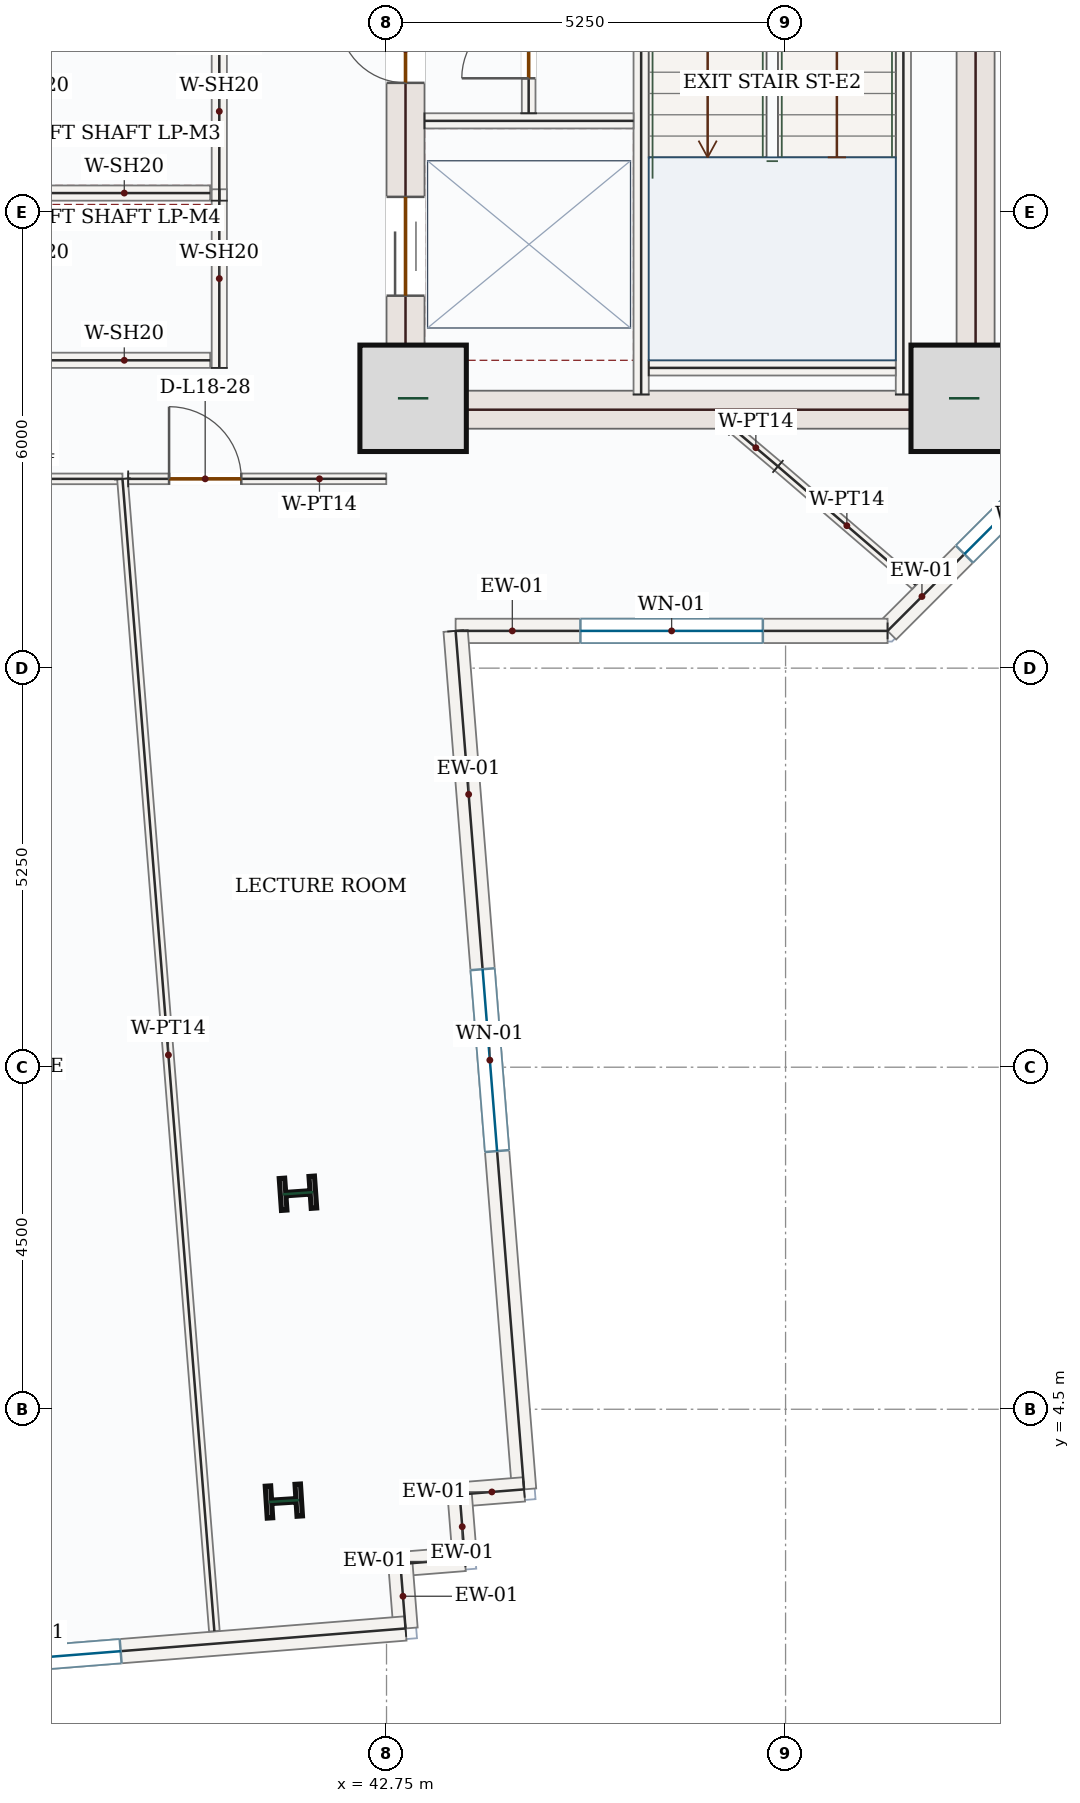
"""IFC4 building model, lengths in metres.
Left out: names, types, materials, properties, quantities, classifications, styles, units other than length and angle.
Written with IfcOpenShell. Run it as: python <this file> out.ifc"""

import sys

from ifc_helpers import new_model, si_unit, direction, frame, frame_2d, origin, origin_2d, place, context, subcontext, project, spatial, rectangle, i_section, extrude, source, transform, mapped, element, fill, save


model = new_model("IFC4")
c1 = context("Model", 3, precision=1e-05, world=origin(), true_north=direction((0.0, 1.0)))
c2 = subcontext(c1, "Body", "Model", "MODEL_VIEW")
j1 = project(units=[si_unit("LENGTHUNIT", "METRE"), si_unit("PLANEANGLEUNIT", "RADIAN")], contexts=[c1])
p1 = place(None, origin())
s1 = spatial("IfcSite", under=j1, at=p1, CompositionType="ELEMENT")
p2 = place(p1, origin())
s2 = spatial("IfcBuilding", under=s1, at=p2, CompositionType="ELEMENT")
p3 = place(p2, frame((0.0, 0.0, 83.7)))
s3 = spatial("IfcBuildingStorey", under=s2, at=p3, CompositionType="ELEMENT", Elevation=83.7)
p4 = place(p3, frame((43.0, 17.4, 0.0), z_axis=(0.0, 0.0, 1.0), x_axis=(0.0, 1.0, 0.0)))
e1 = element("IfcWall", 1, at=p4, inside=s3, PredefinedType="SHEAR", context=c2, shape_type="SweptSolid", body=[
    extrude(rectangle(XDim=8.55, YDim=0.5, at=frame_2d((4.275, 0.0))), origin(), (0.0, 0.0, 1.0), 3.95),
])
p5 = place(p4, frame((6.65, 0.0, 0.0)))
e2 = element("IfcOpeningElement", 2, at=p5, cuts=e1, PredefinedType="OPENING", context=c2, shape_type="SweptSolid", body=[
    extrude(rectangle(XDim=1.1, YDim=2.2, at=frame_2d((0.55, 1.1))), frame((0.0, 0.26, 0.0), z_axis=(0.0, -1.0, 0.0), x_axis=(1.0, 0.0, 0.0)), (0.0, 0.0, 1.0), 0.52),
])
p6 = place(p4, frame((1.75, 0.0, 0.0)))
e3 = element("IfcOpeningElement", 3, at=p6, cuts=e1, PredefinedType="OPENING", context=c2, shape_type="SweptSolid", body=[
    extrude(rectangle(XDim=1.3, YDim=2.2, at=frame_2d((0.65, 1.1))), frame((0.0, 0.26, 0.0), z_axis=(0.0, -1.0, 0.0), x_axis=(1.0, 0.0, 0.0)), (0.0, 0.0, 1.0), 0.52),
])
p7 = place(p4, frame((4.55, 0.0, 0.0)))
e4 = element("IfcOpeningElement", 4, at=p7, cuts=e1, PredefinedType="OPENING", context=c2, shape_type="SweptSolid", body=[
    extrude(rectangle(XDim=0.88, YDim=2.1, at=frame_2d((0.44, 1.05))), frame((0.0, 0.26, 0.0), z_axis=(0.0, -1.0, 0.0), x_axis=(1.0, 0.0, 0.0)), (0.0, 0.0, 1.0), 0.52),
])
m1 = source(origin(), c2, "Body", "SweptSolid", [
    extrude(rectangle(XDim=8.55, YDim=0.5, at=frame_2d((4.275, 0.0))), origin(), (0.0, 0.0, 1.0), 3.95),
])
p8 = place(p3, frame((50.5, 17.4, 0.0), z_axis=(0.0, 0.0, 1.0), x_axis=(0.0, 1.0, 0.0)))
e5 = element("IfcWall", 5, at=p8, inside=s3, PredefinedType="SHEAR", context=c2, shape_type="MappedRepresentation", body=[
    mapped(m1, transform((0.0, 0.0, 0.0), x_axis=(1.0, 0.0, 0.0), y_axis=(0.0, 1.0, 0.0), z_axis=(0.0, 0.0, 1.0), scale=1.0)),
])
m2 = source(origin(), c2, "Body", "SweptSolid", [
    extrude(rectangle(XDim=7.0, YDim=0.5, at=frame_2d((3.5, 0.0))), origin(), (0.0, 0.0, 1.0), 3.95),
])
p9 = place(p3, frame((43.25, 17.65, 0.0), z_axis=(0.0, 0.0, 1.0), x_axis=(1.0, 0.0, 0.0)))
e6 = element("IfcWall", 6, at=p9, inside=s3, PredefinedType="SHEAR", context=c2, shape_type="MappedRepresentation", body=[
    mapped(m2, transform((0.0, 0.0, 0.0), x_axis=(1.0, 0.0, 0.0), y_axis=(0.0, 1.0, 0.0), z_axis=(0.0, 0.0, 1.0), scale=1.0)),
])
m3 = source(origin(), c2, "Body", "SweptSolid", [
    extrude(rectangle(XDim=1.4, YDim=1.4, at=origin_2d()), origin(), (0.0, 0.0, 1.0), 4.2),
])
for number, where, z_axis, x_axis in (
    (7, (43.1, 17.8, 0.0), (0.0, 0.0, 1.0), (1.0, 0.0, 0.0)),
    (8, (50.35, 17.8, 0.0), (0.0, 0.0, 1.0), (1.0, 0.0, 0.0)),
):
    element("IfcColumn", number, at=place(p3, frame(where, z_axis=z_axis, x_axis=x_axis)), inside=s3, PredefinedType="COLUMN", context=c2, shape_type="MappedRepresentation", body=[
        mapped(m3, transform((0.0, 0.0, 0.0), x_axis=(1.0, 0.0, 0.0), y_axis=(0.0, 1.0, 0.0), z_axis=(0.0, 0.0, 1.0), scale=1.0)),
    ])
m4 = source(origin(), c2, "Body", "SweptSolid", [
    extrude(i_section(OverallWidth=0.421, OverallDepth=0.465, WebThickness=0.045, FlangeThickness=0.073, FilletRadius=0.018, at=origin_2d()), origin(), (0.0, 0.0, 1.0), 4.2),
])
for number, where, z_axis, x_axis in (
    (9, (41.585, 7.342, 0.0), (0.0, 0.0, 1.0), (-0.07, 0.998, 0.0)),
    (10, (41.399, 3.292, 0.0), (0.0, 0.0, 1.0), (-0.063, 0.998, 0.0)),
):
    element("IfcColumn", number, at=place(p3, frame(where, z_axis=z_axis, x_axis=x_axis)), inside=s3, PredefinedType="COLUMN", context=c2, shape_type="MappedRepresentation", body=[
        mapped(m4, transform((0.0, 0.0, 0.0), x_axis=(1.0, 0.0, 0.0), y_axis=(0.0, 1.0, 0.0), z_axis=(0.0, 0.0, 1.0), scale=1.0)),
    ])
p10 = place(p3, frame((53.06, 18.458, 0.0), z_axis=(0.0, 0.0, 1.0), x_axis=(-0.707106781187, -0.707106781187, 0.0)))
e11 = element("IfcWall", 11, at=p10, inside=s3, PredefinedType="SOLIDWALL", context=c2, shape_type="SweptSolid", body=[
    extrude(rectangle(XDim=5.258, YDim=0.32, at=frame_2d((2.629, 0.0))), origin(), (0.0, 0.0, 1.0), 3.95),
])
p11 = place(p10, frame((1.429, 0.0, 0.85)))
e12 = element("IfcOpeningElement", 12, at=p11, cuts=e11, PredefinedType="OPENING", context=c2, shape_type="SweptSolid", body=[
    extrude(rectangle(XDim=2.4, YDim=1.8, at=frame_2d((1.2, 0.9))), frame((0.0, 0.17, 0.0), z_axis=(0.0, -1.0, 0.0), x_axis=(1.0, 0.0, 0.0)), (0.0, 0.0, 1.0), 0.34),
])
p12 = place(p3, frame((49.342, 14.74, 0.0), z_axis=(0.0, 0.0, 1.0), x_axis=(-1.0, 0.0, 0.0)))
e13 = element("IfcWall", 13, at=p12, inside=s3, PredefinedType="SOLIDWALL", context=c2, shape_type="SweptSolid", body=[
    extrude(rectangle(XDim=5.683, YDim=0.32, at=frame_2d((2.842, 0.0))), origin(), (0.0, 0.0, 1.0), 3.95),
])
p13 = place(p12, frame((1.641, 0.0, 0.85)))
e14 = element("IfcOpeningElement", 14, at=p13, cuts=e13, PredefinedType="OPENING", context=c2, shape_type="SweptSolid", body=[
    extrude(rectangle(XDim=2.4, YDim=1.8, at=frame_2d((1.2, 0.9))), frame((0.0, 0.17, 0.0), z_axis=(0.0, -1.0, 0.0), x_axis=(1.0, 0.0, 0.0)), (0.0, 0.0, 1.0), 0.34),
])
p14 = place(p3, frame((43.659, 14.74, 0.0), z_axis=(0.0, 0.0, 1.0), x_axis=(0.079512268319, -0.996833887459, 0.0)))
e15 = element("IfcWall", 15, at=p14, inside=s3, PredefinedType="SOLIDWALL", context=c2, shape_type="SweptSolid", body=[
    extrude(rectangle(XDim=11.33, YDim=0.32, at=frame_2d((5.665, 0.0))), origin(), (0.0, 0.0, 1.0), 3.95),
])
p15 = place(p14, frame((4.465, 0.0, 0.85)))
e16 = element("IfcOpeningElement", 16, at=p15, cuts=e15, PredefinedType="OPENING", context=c2, shape_type="SweptSolid", body=[
    extrude(rectangle(XDim=2.4, YDim=1.8, at=frame_2d((1.2, 0.9))), frame((0.0, 0.17, 0.0), z_axis=(0.0, -1.0, 0.0), x_axis=(1.0, 0.0, 0.0)), (0.0, 0.0, 1.0), 0.34),
])
m5 = source(origin(), c2, "Body", "SweptSolid", [
    extrude(rectangle(XDim=0.85, YDim=0.32, at=frame_2d((0.425, 0.0))), origin(), (0.0, 0.0, 1.0), 3.95),
])
for number, where, z_axis, x_axis in (
    (17, (44.56, 3.446, 0.0), (0.0, 0.0, 1.0), (-0.997, -0.079, 0.0)),
    (18, (43.712, 3.378, 0.0), (0.0, 0.0, 1.0), (0.08, -0.997, 0.0)),
    (19, (43.78, 2.531, 0.0), (0.0, 0.0, 1.0), (-0.997, -0.08, 0.0)),
):
    element("IfcWall", number, at=place(p3, frame(where, z_axis=z_axis, x_axis=x_axis)), inside=s3, PredefinedType="SOLIDWALL", context=c2, shape_type="MappedRepresentation", body=[
        mapped(m5, transform((0.0, 0.0, 0.0), x_axis=(1.0, 0.0, 0.0), y_axis=(0.0, 1.0, 0.0), z_axis=(0.0, 0.0, 1.0), scale=1.0)),
    ])
m6 = source(origin(), c2, "Body", "SweptSolid", [
    extrude(rectangle(XDim=0.85, YDim=0.32, at=frame_2d((0.425, 0.0))), origin(), (0.0, 0.0, 1.0), 3.95),
])
p16 = place(p3, frame((42.933, 2.463, 0.0), z_axis=(0.0, 0.0, 1.0), x_axis=(0.079573954853, -0.996828965123, 0.0)))
e20 = element("IfcWall", 20, at=p16, inside=s3, PredefinedType="SOLIDWALL", context=c2, shape_type="MappedRepresentation", body=[
    mapped(m6, transform((0.0, 0.0, 0.0), x_axis=(1.0, 0.0, 0.0), y_axis=(0.0, 1.0, 0.0), z_axis=(0.0, 0.0, 1.0), scale=1.0)),
])
p17 = place(p3, frame((43.0, 1.616, 0.0), z_axis=(0.0, 0.0, 1.0), x_axis=(-0.996833485558, -0.079517306731, 0.0)))
e21 = element("IfcWall", 21, at=p17, inside=s3, PredefinedType="SOLIDWALL", context=c2, shape_type="SweptSolid", body=[
    extrude(rectangle(XDim=9.92, YDim=0.32, at=frame_2d((4.96, 0.0))), origin(), (0.0, 0.0, 1.0), 3.95),
])
p18 = place(p17, frame((3.76, 0.0, 0.85)))
e22 = element("IfcOpeningElement", 22, at=p18, cuts=e21, PredefinedType="OPENING", context=c2, shape_type="SweptSolid", body=[
    extrude(rectangle(XDim=2.4, YDim=1.8, at=frame_2d((1.2, 0.9))), frame((0.0, 0.17, 0.0), z_axis=(0.0, -1.0, 0.0), x_axis=(1.0, 0.0, 0.0)), (0.0, 0.0, 1.0), 0.34),
])
m7 = source(origin(), c2, "Body", "SweptSolid", [
    extrude(rectangle(XDim=7.87, YDim=0.2, at=frame_2d((3.935, 0.0))), origin(), (0.0, 0.0, 1.0), 3.95),
])
p19 = place(p3, frame((49.55, 17.85, 0.0), z_axis=(0.0, 0.0, 1.0), x_axis=(0.0, 1.0, 0.0)))
e23 = element("IfcWall", 23, at=p19, inside=s3, PredefinedType="SOLIDWALL", context=c2, shape_type="MappedRepresentation", body=[
    mapped(m7, transform((0.0, 0.0, 0.0), x_axis=(1.0, 0.0, 0.0), y_axis=(0.0, 1.0, 0.0), z_axis=(0.0, 0.0, 1.0), scale=1.0)),
])
p20 = place(p3, frame((46.1, 17.85, 0.0), z_axis=(0.0, 0.0, 1.0), x_axis=(0.0, 1.0, 0.0)))
e24 = element("IfcWall", 24, at=p20, inside=s3, PredefinedType="SOLIDWALL", context=c2, shape_type="SweptSolid", body=[
    extrude(rectangle(XDim=8.0, YDim=0.2, at=frame_2d((4.0, 0.0))), origin(), (0.0, 0.0, 1.0), 3.95),
])
p21 = place(p20, frame((6.3, 0.0, 0.0)))
e25 = element("IfcOpeningElement", 25, at=p21, cuts=e24, PredefinedType="OPENING", context=c2, shape_type="SweptSolid", body=[
    extrude(rectangle(XDim=1.05, YDim=2.15, at=frame_2d((0.525, 1.075))), frame((0.0, 0.11, 0.0), z_axis=(0.0, -1.0, 0.0), x_axis=(1.0, 0.0, 0.0)), (0.0, 0.0, 1.0), 0.22),
])
m8 = source(origin(), c2, "Body", "SweptSolid", [
    extrude(rectangle(XDim=3.25, YDim=0.2, at=frame_2d((1.625, 0.0))), origin(), (0.0, 0.0, 1.0), 3.95),
])
p22 = place(p3, frame((46.2, 18.2, 0.0), z_axis=(0.0, 0.0, 1.0), x_axis=(1.0, 0.0, 0.0)))
e26 = element("IfcWall", 26, at=p22, inside=s3, PredefinedType="SOLIDWALL", context=c2, shape_type="MappedRepresentation", body=[
    mapped(m8, transform((0.0, 0.0, 0.0), x_axis=(1.0, 0.0, 0.0), y_axis=(0.0, 1.0, 0.0), z_axis=(0.0, 0.0, 1.0), scale=1.0)),
])
m9 = source(origin(), c2, "Body", "SweptSolid", [
    extrude(rectangle(XDim=2.75, YDim=0.2, at=frame_2d((1.375, 0.0))), origin(), (0.0, 0.0, 1.0), 3.95),
])
p23 = place(p3, frame((43.25, 21.45, 0.0), z_axis=(0.0, 0.0, 1.0), x_axis=(1.0, 0.0, 0.0)))
e27 = element("IfcWall", 27, at=p23, inside=s3, PredefinedType="SOLIDWALL", context=c2, shape_type="MappedRepresentation", body=[
    mapped(m9, transform((0.0, 0.0, 0.0), x_axis=(1.0, 0.0, 0.0), y_axis=(0.0, 1.0, 0.0), z_axis=(0.0, 0.0, 1.0), scale=1.0)),
])
p24 = place(p3, frame((44.62, 21.55, 0.0), z_axis=(0.0, 0.0, 1.0), x_axis=(0.0, 1.0, 0.0)))
e28 = element("IfcWall", 28, at=p24, inside=s3, PredefinedType="PARTITIONING", context=c2, shape_type="SweptSolid", body=[
    extrude(rectangle(XDim=1.8, YDim=0.18, at=frame_2d((0.9, 0.0))), origin(), (0.0, 0.0, 1.0), 3.95),
])
p25 = place(p24, frame((0.46, 0.0, 0.0)))
e29 = element("IfcOpeningElement", 29, at=p25, cuts=e28, PredefinedType="OPENING", context=c2, shape_type="SweptSolid", body=[
    extrude(rectangle(XDim=0.88, YDim=2.1, at=frame_2d((0.44, 1.05))), frame((0.0, 0.1, 0.0), z_axis=(0.0, -1.0, 0.0), x_axis=(1.0, 0.0, 0.0)), (0.0, 0.0, 1.0), 0.2),
])
m10 = source(origin(), c2, "Body", "SweptSolid", [
    extrude(rectangle(XDim=2.35, YDim=0.2, at=frame_2d((1.175, 0.0))), origin(), (0.0, 0.0, 1.0), 3.95),
])
p26 = place(p3, frame((40.55, 20.4, 0.0), z_axis=(0.0, 0.0, 1.0), x_axis=(0.0, 1.0, 0.0)))
e30 = element("IfcWall", 30, at=p26, inside=s3, PredefinedType="SOLIDWALL", context=c2, shape_type="MappedRepresentation", body=[
    mapped(m10, transform((0.0, 0.0, 0.0), x_axis=(1.0, 0.0, 0.0), y_axis=(0.0, 1.0, 0.0), z_axis=(0.0, 0.0, 1.0), scale=1.0)),
])
m11 = source(origin(), c2, "Body", "SweptSolid", [
    extrude(rectangle(XDim=2.26, YDim=0.2, at=frame_2d((1.13, 0.0))), origin(), (0.0, 0.0, 1.0), 3.95),
])
p27 = place(p3, frame((38.17, 20.5, 0.0), z_axis=(0.0, 0.0, 1.0), x_axis=(1.0, 0.0, 0.0)))
e31 = element("IfcWall", 31, at=p27, inside=s3, PredefinedType="SOLIDWALL", context=c2, shape_type="MappedRepresentation", body=[
    mapped(m11, transform((0.0, 0.0, 0.0), x_axis=(1.0, 0.0, 0.0), y_axis=(0.0, 1.0, 0.0), z_axis=(0.0, 0.0, 1.0), scale=1.0)),
])
p28 = place(p3, frame((40.55, 18.2, 0.0), z_axis=(0.0, 0.0, 1.0), x_axis=(0.0, 1.0, 0.0)))
e32 = element("IfcWall", 32, at=p28, inside=s3, PredefinedType="SOLIDWALL", context=c2, shape_type="MappedRepresentation", body=[
    mapped(m10, transform((0.0, 0.0, 0.0), x_axis=(1.0, 0.0, 0.0), y_axis=(0.0, 1.0, 0.0), z_axis=(0.0, 0.0, 1.0), scale=1.0)),
])
p29 = place(p3, frame((38.17, 18.3, 0.0), z_axis=(0.0, 0.0, 1.0), x_axis=(1.0, 0.0, 0.0)))
e33 = element("IfcWall", 33, at=p29, inside=s3, PredefinedType="SOLIDWALL", context=c2, shape_type="MappedRepresentation", body=[
    mapped(m11, transform((0.0, 0.0, 0.0), x_axis=(1.0, 0.0, 0.0), y_axis=(0.0, 1.0, 0.0), z_axis=(0.0, 0.0, 1.0), scale=1.0)),
])
p30 = place(p3, frame((34.616, 16.74, 0.0), z_axis=(0.0, 0.0, 1.0), x_axis=(1.0, 0.0, 0.0)))
e34 = element("IfcWall", 34, at=p30, inside=s3, PredefinedType="PARTITIONING", context=c2, shape_type="SweptSolid", body=[
    extrude(rectangle(XDim=4.66, YDim=0.14, at=frame_2d((2.33, 0.0))), origin(), (0.0, 0.0, 1.0), 3.95),
])
p31 = place(p30, frame((0.816, 0.0, 0.0)))
e35 = element("IfcOpeningElement", 35, at=p31, cuts=e34, PredefinedType="OPENING", context=c2, shape_type="SweptSolid", body=[
    extrude(rectangle(XDim=0.95, YDim=2.15, at=frame_2d((0.475, 1.075))), frame((0.0, 0.08, 0.0), z_axis=(0.0, -1.0, 0.0), x_axis=(1.0, 0.0, 0.0)), (0.0, 0.0, 1.0), 0.16),
])
m12 = source(origin(), c2, "Body", "SweptSolid", [
    extrude(rectangle(XDim=15.207, YDim=0.14, at=frame_2d((7.604, 0.0))), origin(), (0.0, 0.0, 1.0), 3.95),
])
p32 = place(p3, frame((39.276, 16.74, 0.0), z_axis=(0.0, 0.0, 1.0), x_axis=(0.07950146843, -0.996834748851, 0.0)))
e36 = element("IfcWall", 36, at=p32, inside=s3, PredefinedType="PARTITIONING", context=c2, shape_type="MappedRepresentation", body=[
    mapped(m12, transform((0.0, 0.0, 0.0), x_axis=(1.0, 0.0, 0.0), y_axis=(0.0, 1.0, 0.0), z_axis=(0.0, 0.0, 1.0), scale=1.0)),
])
p33 = place(p3, frame((39.351, 16.74, 0.0), z_axis=(0.0, 0.0, 1.0), x_axis=(0.999999935369, 0.000359531148, 0.0)))
e37 = element("IfcWall", 37, at=p33, inside=s3, PredefinedType="PARTITIONING", context=c2, shape_type="SweptSolid", body=[
    extrude(rectangle(XDim=3.395, YDim=0.14, at=frame_2d((1.698, 0.0))), origin(), (0.0, 0.0, 1.0), 3.95),
])
p34 = place(p33, frame((0.538, 0.0, 0.0)))
e38 = element("IfcOpeningElement", 38, at=p34, cuts=e37, PredefinedType="OPENING", context=c2, shape_type="SweptSolid", body=[
    extrude(rectangle(XDim=0.95, YDim=2.15, at=frame_2d((0.475, 1.075))), frame((0.0, 0.08, 0.0), z_axis=(0.0, -1.0, 0.0), x_axis=(1.0, 0.0, 0.0)), (0.0, 0.0, 1.0), 0.16),
])
m13 = source(origin(), c2, "Body", "SweptSolid", [
    extrude(rectangle(XDim=0.761, YDim=0.14, at=frame_2d((0.38, 0.0))), origin(), (0.0, 0.0, 1.0), 3.95),
])
p35 = place(p3, frame((47.318, 17.395, 0.0), z_axis=(0.0, 0.0, 1.0), x_axis=(0.764128340752, -0.645064243978, 0.0)))
e39 = element("IfcWall", 39, at=p35, inside=s3, PredefinedType="PARTITIONING", context=c2, shape_type="MappedRepresentation", body=[
    mapped(m13, transform((0.0, 0.0, 0.0), x_axis=(1.0, 0.0, 0.0), y_axis=(0.0, 1.0, 0.0), z_axis=(0.0, 0.0, 1.0), scale=1.0)),
])
m14 = source(origin(), c2, "Body", "SweptSolid", [
    extrude(rectangle(XDim=2.392, YDim=0.14, at=frame_2d((1.196, 0.0))), origin(), (0.0, 0.0, 1.0), 3.95),
])
p36 = place(p3, frame((47.9, 16.904, 0.0), z_axis=(0.0, 0.0, 1.0), x_axis=(0.758044905356, -0.652202362357, 0.0)))
e40 = element("IfcWall", 40, at=p36, inside=s3, PredefinedType="PARTITIONING", context=c2, shape_type="MappedRepresentation", body=[
    mapped(m14, transform((0.0, 0.0, 0.0), x_axis=(1.0, 0.0, 0.0), y_axis=(0.0, 1.0, 0.0), z_axis=(0.0, 0.0, 1.0), scale=1.0)),
])
m15 = source(origin(), c2, "Body", "SweptSolid", [
    extrude(rectangle(XDim=2.4, YDim=1.8, at=frame_2d((1.2, 0.9))), frame((0.0, 0.03, 0.0), z_axis=(0.0, -1.0, 0.0), x_axis=(1.0, 0.0, 0.0)), (0.0, 0.0, 1.0), 0.06),
])
p37 = place(p11, origin())
e41 = element("IfcWindow", 41, at=p37, inside=s3, PartitioningType="DOUBLE_PANEL_VERTICAL", PredefinedType="WINDOW", context=c2, shape_type="MappedRepresentation", body=[
    mapped(m15, transform((0.0, 0.0, 0.0), x_axis=(1.0, 0.0, 0.0), y_axis=(0.0, 1.0, 0.0), z_axis=(0.0, 0.0, 1.0), scale=1.0)),
])
fill(e12, e41)
p38 = place(p13, origin())
e42 = element("IfcWindow", 42, at=p38, inside=s3, PartitioningType="DOUBLE_PANEL_VERTICAL", PredefinedType="WINDOW", context=c2, shape_type="MappedRepresentation", body=[
    mapped(m15, transform((0.0, 0.0, 0.0), x_axis=(1.0, 0.0, 0.0), y_axis=(0.0, 1.0, 0.0), z_axis=(0.0, 0.0, 1.0), scale=1.0)),
])
fill(e14, e42)
p39 = place(p15, origin())
e43 = element("IfcWindow", 43, at=p39, inside=s3, PartitioningType="DOUBLE_PANEL_VERTICAL", PredefinedType="WINDOW", context=c2, shape_type="MappedRepresentation", body=[
    mapped(m15, transform((0.0, 0.0, 0.0), x_axis=(1.0, 0.0, 0.0), y_axis=(0.0, 1.0, 0.0), z_axis=(0.0, 0.0, 1.0), scale=1.0)),
])
fill(e16, e43)
p40 = place(p18, origin())
e44 = element("IfcWindow", 44, at=p40, inside=s3, PartitioningType="DOUBLE_PANEL_VERTICAL", PredefinedType="WINDOW", context=c2, shape_type="MappedRepresentation", body=[
    mapped(m15, transform((0.0, 0.0, 0.0), x_axis=(1.0, 0.0, 0.0), y_axis=(0.0, 1.0, 0.0), z_axis=(0.0, 0.0, 1.0), scale=1.0)),
])
fill(e22, e44)
m16 = source(origin(), c2, "Body", "SweptSolid", [
    extrude(rectangle(XDim=1.3, YDim=2.2, at=frame_2d((0.65, 1.1))), frame((0.0, 0.025, 0.0), z_axis=(0.0, -1.0, 0.0), x_axis=(1.0, 0.0, 0.0)), (0.0, 0.0, 1.0), 0.05),
])
p41 = place(p6, origin())
e45 = element("IfcDoor", 45, at=p41, inside=s3, OperationType="DOUBLE_DOOR_SLIDING", PredefinedType="DOOR", context=c2, shape_type="MappedRepresentation", body=[
    mapped(m16, transform((0.0, 0.0, 0.0), x_axis=(1.0, 0.0, 0.0), y_axis=(0.0, 1.0, 0.0), z_axis=(0.0, 0.0, 1.0), scale=1.0)),
])
fill(e3, e45)
m17 = source(origin(), c2, "Body", "SweptSolid", [
    extrude(rectangle(XDim=0.88, YDim=2.1, at=frame_2d((0.44, 1.05))), frame((0.0, 0.025, 0.0), z_axis=(0.0, -1.0, 0.0), x_axis=(1.0, 0.0, 0.0)), (0.0, 0.0, 1.0), 0.05),
])
p42 = place(p7, origin())
e46 = element("IfcDoor", 46, at=p42, inside=s3, OperationType="SINGLE_SWING_RIGHT", PredefinedType="DOOR", context=c2, shape_type="MappedRepresentation", body=[
    mapped(m17, transform((0.0, 0.0, 0.0), x_axis=(1.0, 0.0, 0.0), y_axis=(0.0, 1.0, 0.0), z_axis=(0.0, 0.0, 1.0), scale=1.0)),
])
fill(e4, e46)
p43 = place(p25, origin())
e47 = element("IfcDoor", 47, at=p43, inside=s3, OperationType="SINGLE_SWING_LEFT", PredefinedType="DOOR", context=c2, shape_type="MappedRepresentation", body=[
    mapped(m17, transform((0.0, 0.0, 0.0), x_axis=(1.0, 0.0, 0.0), y_axis=(0.0, 1.0, 0.0), z_axis=(0.0, 0.0, 1.0), scale=1.0)),
])
fill(e29, e47)
m18 = source(origin(), c2, "Body", "SweptSolid", [
    extrude(rectangle(XDim=0.95, YDim=2.15, at=frame_2d((0.475, 1.075))), frame((0.0, 0.025, 0.0), z_axis=(0.0, -1.0, 0.0), x_axis=(1.0, 0.0, 0.0)), (0.0, 0.0, 1.0), 0.05),
])
p44 = place(p34, origin())
e48 = element("IfcDoor", 48, at=p44, inside=s3, OperationType="SINGLE_SWING_LEFT", PredefinedType="DOOR", context=c2, shape_type="MappedRepresentation", body=[
    mapped(m18, transform((0.0, 0.0, 0.0), x_axis=(1.0, 0.0, 0.0), y_axis=(0.0, 1.0, 0.0), z_axis=(0.0, 0.0, 1.0), scale=1.0)),
])
fill(e38, e48)
save(model, sys.argv[1])
